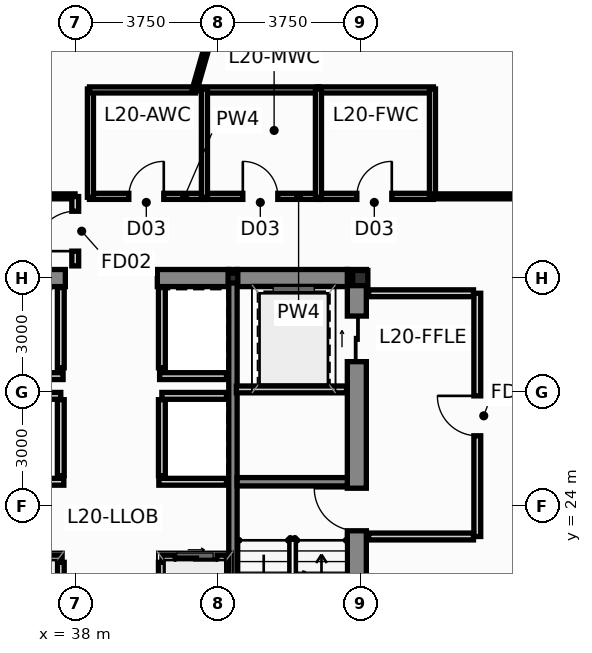
"""IFC4 building model, lengths in metres.
Left out: names, types, materials, properties, quantities, classifications, styles, units other than length and angle.
Written with IfcOpenShell. Run it as: python <this file> out.ifc"""

import sys

from ifc_helpers import new_model, si_unit, direction, frame, frame_2d, origin, origin_2d, place, context, subcontext, project, spatial, rectangle, i_section, extrude, source, transform, mapped, element, fill, save


model = new_model("IFC4")
c1 = context("Model", 3, precision=1e-05, world=origin(), true_north=direction((0.0, 1.0)))
c2 = subcontext(c1, "Body", "Model", "MODEL_VIEW")
j1 = project(units=[si_unit("LENGTHUNIT", "METRE"), si_unit("PLANEANGLEUNIT", "RADIAN")], contexts=[c1])
p1 = place(None, origin())
s1 = spatial("IfcSite", under=j1, at=p1, CompositionType="ELEMENT")
p2 = place(p1, origin())
s2 = spatial("IfcBuilding", under=s1, at=p2, CompositionType="ELEMENT")
p3 = place(p2, frame((0.0, 0.0, 79.85)))
s3 = spatial("IfcBuildingStorey", under=s2, at=p3, CompositionType="ELEMENT", Elevation=79.85)
m1 = source(origin(), c2, "Body", "SweptSolid", [
    extrude(i_section(OverallWidth=0.4, OverallDepth=0.4, WebThickness=0.02, FlangeThickness=0.032, at=origin_2d()), origin(), (0.0, 0.0, 1.0), 3.65),
])
p4 = place(p3, frame((45.5, 30.0, 0.0), z_axis=(0.0, 0.0, 1.0), x_axis=(1.0, 0.0, 0.0)))
e1 = element("IfcColumn", 1, at=p4, inside=s3, PredefinedType="COLUMN", context=c2, shape_type="MappedRepresentation", body=[
    mapped(m1, transform((0.0, 0.0, 0.0), scale=1.0)),
])
m2 = source(origin(), c2, "Body", "SweptSolid", [
    extrude(i_section(OverallWidth=0.256, OverallDepth=0.26, WebThickness=0.01, FlangeThickness=0.017, at=origin_2d()), origin(), (0.0, 0.0, 1.0), 3.65),
])
p5 = place(p3, frame((42.15, 30.0, 0.0), z_axis=(0.0, 0.0, 1.0), x_axis=(1.0, 0.0, 0.0)))
e2 = element("IfcColumn", 2, at=p5, inside=s3, PredefinedType="COLUMN", context=c2, shape_type="MappedRepresentation", body=[
    mapped(m2, transform((0.0, 0.0, 0.0), scale=1.0)),
])
p6 = place(p3, frame((45.41, 16.95, 0.0), z_axis=(0.0, 0.0, 1.0), x_axis=(0.0, 1.0, 0.0)))
e3 = element("IfcWall", 3, at=p6, inside=s3, PredefinedType="SHEAR", context=c2, shape_type="SweptSolid", body=[
    extrude(rectangle(XDim=13.275, YDim=0.5, at=frame_2d((6.638, 0.0))), origin(), (0.0, 0.0, 1.0), 3.65),
])
p7 = place(p6, frame((6.4, 0.0, 0.0)))
e4 = element("IfcOpeningElement", 4, at=p7, cuts=e3, PredefinedType="OPENING", context=c2, shape_type="SweptSolid", body=[
    extrude(rectangle(XDim=1.12, YDim=2.15, at=frame_2d((0.56, 1.075))), frame((0.0, 0.262, 0.0), z_axis=(0.0, -1.0, 0.0), x_axis=(1.0, 0.0, 0.0)), (0.0, 0.0, 1.0), 0.524),
])
p8 = place(p6, frame((10.85, 0.0, 0.0)))
e5 = element("IfcOpeningElement", 5, at=p8, cuts=e3, PredefinedType="OPENING", context=c2, shape_type="SweptSolid", body=[
    extrude(rectangle(XDim=1.2, YDim=2.2, at=frame_2d((0.6, 1.1))), frame((0.0, 0.262, 0.0), z_axis=(0.0, -1.0, 0.0), x_axis=(1.0, 0.0, 0.0)), (0.0, 0.0, 1.0), 0.524),
])
p9 = place(p3, frame((33.96, 30.0, 0.0), z_axis=(0.0, 0.0, 1.0), x_axis=(1.0, 0.0, 0.0)))
e6 = element("IfcWall", 6, at=p9, inside=s3, PredefinedType="SHEAR", context=c2, shape_type="SweptSolid", body=[
    extrude(rectangle(XDim=3.78, YDim=0.45, at=frame_2d((1.89, 0.0))), origin(), (0.0, 0.0, 1.0), 3.65),
])
p10 = place(p3, frame((40.16, 30.0, 0.0), z_axis=(0.0, 0.0, 1.0), x_axis=(1.0, 0.0, 0.0)))
e7 = element("IfcWall", 7, at=p10, inside=s3, PredefinedType="SHEAR", context=c2, shape_type="SweptSolid", body=[
    extrude(rectangle(XDim=1.88, YDim=0.45, at=frame_2d((0.94, 0.0))), origin(), (0.0, 0.0, 1.0), 3.65),
])
p11 = place(p3, frame((42.26, 30.0, 0.0), z_axis=(0.0, 0.0, 1.0), x_axis=(1.0, 0.0, 0.0)))
e8 = element("IfcWall", 8, at=p11, inside=s3, PredefinedType="SHEAR", context=c2, shape_type="SweptSolid", body=[
    extrude(rectangle(XDim=2.9, YDim=0.45, at=frame_2d((1.45, 0.0))), origin(), (0.0, 0.0, 1.0), 3.65),
])
p12 = place(p3, frame((42.15, 16.95, 0.0), z_axis=(0.0, 0.0, 1.0), x_axis=(0.0, 1.0, 0.0)))
e9 = element("IfcWall", 9, at=p12, inside=s3, PredefinedType="SHEAR", context=c2, shape_type="SweptSolid", body=[
    extrude(rectangle(XDim=13.275, YDim=0.22, at=frame_2d((6.638, 0.0))), origin(), (0.0, 0.0, 1.0), 3.65),
])
p13 = place(p3, frame((42.26, 24.64, 0.0), z_axis=(0.0, 0.0, 1.0), x_axis=(1.0, 0.0, 0.0)))
e10 = element("IfcWall", 10, at=p13, inside=s3, PredefinedType="SHEAR", context=c2, shape_type="SweptSolid", body=[
    extrude(rectangle(XDim=2.9, YDim=0.22, at=frame_2d((1.45, 0.0))), origin(), (0.0, 0.0, 1.0), 3.65),
])
p14 = place(p3, frame((34.02, 22.62, 0.0), z_axis=(0.0, 0.0, 1.0), x_axis=(1.0, 0.0, 0.0)))
e11 = element("IfcWall", 11, at=p14, inside=s3, PredefinedType="PARTITIONING", context=c2, shape_type="SweptSolid", body=[
    extrude(rectangle(XDim=3.6, YDim=0.18, at=frame_2d((1.8, 0.0))), origin(), (0.0, 0.0, 1.0), 3.4),
])
p15 = place(p14, frame((0.32, 0.0, 0.0)))
e12 = element("IfcOpeningElement", 12, at=p15, cuts=e11, PredefinedType="OPENING", context=c2, shape_type="SweptSolid", body=[
    extrude(rectangle(XDim=1.1, YDim=2.2, at=frame_2d((0.55, 1.1))), frame((0.0, 0.102, 0.0), z_axis=(0.0, -1.0, 0.0), x_axis=(1.0, 0.0, 0.0)), (0.0, 0.0, 1.0), 0.204),
])
p16 = place(p14, frame((2.12, 0.0, 0.0)))
e13 = element("IfcOpeningElement", 13, at=p16, cuts=e11, PredefinedType="OPENING", context=c2, shape_type="SweptSolid", body=[
    extrude(rectangle(XDim=1.1, YDim=2.2, at=frame_2d((0.55, 1.1))), frame((0.0, 0.102, 0.0), z_axis=(0.0, -1.0, 0.0), x_axis=(1.0, 0.0, 0.0)), (0.0, 0.0, 1.0), 0.204),
])
p17 = place(p3, frame((40.28, 22.62, 0.0), z_axis=(0.0, 0.0, 1.0), x_axis=(1.0, 0.0, 0.0)))
e14 = element("IfcWall", 14, at=p17, inside=s3, PredefinedType="PARTITIONING", context=c2, shape_type="SweptSolid", body=[
    extrude(rectangle(XDim=1.7, YDim=0.18, at=frame_2d((0.85, 0.0))), origin(), (0.0, 0.0, 1.0), 3.4),
])
p18 = place(p17, frame((0.35, 0.0, 0.0)))
e15 = element("IfcOpeningElement", 15, at=p18, cuts=e14, PredefinedType="OPENING", context=c2, shape_type="SweptSolid", body=[
    extrude(rectangle(XDim=1.1, YDim=2.2, at=frame_2d((0.55, 1.1))), frame((0.0, 0.102, 0.0), z_axis=(0.0, -1.0, 0.0), x_axis=(1.0, 0.0, 0.0)), (0.0, 0.0, 1.0), 0.204),
])
for number, where, z_axis, x_axis in (
    (16, (37.62, 20.52, 0.0), (0.0, 0.0, 1.0), (0.0, 1.0, 0.0)),
    (17, (40.28, 20.52, 0.0), (0.0, 0.0, 1.0), (0.0, 1.0, 0.0)),
):
    element("IfcWall", number, at=place(p3, frame(where, z_axis=z_axis, x_axis=x_axis)), inside=s3, PredefinedType="PARTITIONING", context=c2, shape_type="SweptSolid", body=[
        extrude(rectangle(XDim=2.0, YDim=0.18, at=frame_2d((1.0, 0.0))), origin(), (0.0, 0.0, 1.0), 3.4),
    ])
p19 = place(p3, frame((34.02, 26.9, 0.0), z_axis=(0.0, 0.0, 1.0), x_axis=(1.0, 0.0, 0.0)))
e18 = element("IfcWall", 18, at=p19, inside=s3, PredefinedType="PARTITIONING", context=c2, shape_type="SweptSolid", body=[
    extrude(rectangle(XDim=3.6, YDim=0.18, at=frame_2d((1.8, 0.0))), origin(), (0.0, 0.0, 1.0), 3.4),
])
p20 = place(p3, frame((40.28, 26.9, 0.0), z_axis=(0.0, 0.0, 1.0), x_axis=(1.0, 0.0, 0.0)))
e19 = element("IfcWall", 19, at=p20, inside=s3, PredefinedType="PARTITIONING", context=c2, shape_type="SweptSolid", body=[
    extrude(rectangle(XDim=1.7, YDim=0.18, at=frame_2d((0.85, 0.0))), origin(), (0.0, 0.0, 1.0), 3.4),
])
for number, where, z_axis, x_axis in (
    (20, (37.62, 24.8, 0.0), (0.0, 0.0, 1.0), (0.0, 1.0, 0.0)),
    (21, (40.28, 24.8, 0.0), (0.0, 0.0, 1.0), (0.0, 1.0, 0.0)),
):
    element("IfcWall", number, at=place(p3, frame(where, z_axis=z_axis, x_axis=x_axis)), inside=s3, PredefinedType="PARTITIONING", context=c2, shape_type="SweptSolid", body=[
        extrude(rectangle(XDim=2.0, YDim=0.18, at=frame_2d((1.0, 0.0))), origin(), (0.0, 0.0, 1.0), 3.4),
    ])
p21 = place(p3, frame((34.02, 24.64, 0.0), z_axis=(0.0, 0.0, 1.0), x_axis=(1.0, 0.0, 0.0)))
e22 = element("IfcWall", 22, at=p21, inside=s3, PredefinedType="PARTITIONING", context=c2, shape_type="SweptSolid", body=[
    extrude(rectangle(XDim=3.68, YDim=0.18, at=frame_2d((1.84, 0.0))), origin(), (0.0, 0.0, 1.0), 3.4),
])
p22 = place(p3, frame((40.2, 24.64, 0.0), z_axis=(0.0, 0.0, 1.0), x_axis=(1.0, 0.0, 0.0)))
e23 = element("IfcWall", 23, at=p22, inside=s3, PredefinedType="PARTITIONING", context=c2, shape_type="SweptSolid", body=[
    extrude(rectangle(XDim=1.78, YDim=0.18, at=frame_2d((0.89, 0.0))), origin(), (0.0, 0.0, 1.0), 3.4),
])
p23 = place(p3, frame((34.02, 27.42, 0.0), z_axis=(0.0, 0.0, 1.0), x_axis=(1.0, 0.0, 0.0)))
e24 = element("IfcWall", 24, at=p23, inside=s3, PredefinedType="PARTITIONING", context=c2, shape_type="SweptSolid", body=[
    extrude(rectangle(XDim=3.66, YDim=0.18, at=frame_2d((1.83, 0.0))), origin(), (0.0, 0.0, 1.0), 3.4),
])
p24 = place(p3, frame((40.22, 27.42, 0.0), z_axis=(0.0, 0.0, 1.0), x_axis=(1.0, 0.0, 0.0)))
e25 = element("IfcWall", 25, at=p24, inside=s3, PredefinedType="PARTITIONING", context=c2, shape_type="SweptSolid", body=[
    extrude(rectangle(XDim=1.76, YDim=0.18, at=frame_2d((0.88, 0.0))), origin(), (0.0, 0.0, 1.0), 3.4),
])
for number, where, z_axis, x_axis in (
    (26, (37.62, 27.64, 0.0), (0.0, 0.0, 1.0), (0.0, 1.0, 0.0)),
    (27, (40.28, 27.64, 0.0), (0.0, 0.0, 1.0), (0.0, 1.0, 0.0)),
):
    element("IfcWall", number, at=place(p3, frame(where, z_axis=z_axis, x_axis=x_axis)), inside=s3, PredefinedType="PARTITIONING", context=c2, shape_type="SweptSolid", body=[
        extrude(rectangle(XDim=2.11, YDim=0.18, at=frame_2d((1.055, 0.0))), origin(), (0.0, 0.0, 1.0), 3.4),
    ])
p25 = place(p3, frame((48.58, 23.2, 0.0), z_axis=(0.0, 0.0, 1.0), x_axis=(0.0, 1.0, 0.0)))
e28 = element("IfcWall", 28, at=p25, inside=s3, PredefinedType="PARTITIONING", context=c2, shape_type="SweptSolid", body=[
    extrude(rectangle(XDim=6.4, YDim=0.18, at=frame_2d((3.2, 0.0))), origin(), (0.0, 0.0, 1.0), 3.4),
])
p26 = place(p25, frame((2.65, 0.0, 0.0)))
e29 = element("IfcOpeningElement", 29, at=p26, cuts=e28, PredefinedType="OPENING", context=c2, shape_type="SweptSolid", body=[
    extrude(rectangle(XDim=1.05, YDim=2.15, at=frame_2d((0.525, 1.075))), frame((0.0, 0.102, 0.0), z_axis=(0.0, -1.0, 0.0), x_axis=(1.0, 0.0, 0.0)), (0.0, 0.0, 1.0), 0.204),
])
p27 = place(p3, frame((45.72, 23.2, 0.0), z_axis=(0.0, 0.0, 1.0), x_axis=(1.0, 0.0, 0.0)))
e30 = element("IfcWall", 30, at=p27, inside=s3, PredefinedType="PARTITIONING", context=c2, shape_type="SweptSolid", body=[
    extrude(rectangle(XDim=2.76, YDim=0.18, at=frame_2d((1.38, 0.0))), origin(), (0.0, 0.0, 1.0), 3.4),
])
p28 = place(p3, frame((45.72, 29.6, 0.0), z_axis=(0.0, 0.0, 1.0), x_axis=(1.0, 0.0, 0.0)))
e31 = element("IfcWall", 31, at=p28, inside=s3, PredefinedType="PARTITIONING", context=c2, shape_type="SweptSolid", body=[
    extrude(rectangle(XDim=2.76, YDim=0.18, at=frame_2d((1.38, 0.0))), origin(), (0.0, 0.0, 1.0), 2.783),
])
p29 = place(p3, frame((42.24, 27.07, 0.0), z_axis=(0.0, 0.0, 1.0), x_axis=(1.0, 0.0, 0.0)))
e32 = element("IfcWall", 32, at=p29, inside=s3, PredefinedType="PARTITIONING", context=c2, shape_type="SweptSolid", body=[
    extrude(rectangle(XDim=2.9, YDim=0.18, at=frame_2d((1.45, 0.0))), origin(), (0.0, 0.0, 1.0), 3.4),
])
p30 = place(p3, frame((38.375, 32.15, 0.0), z_axis=(0.0, 0.0, 1.0), x_axis=(1.0, 0.0, 0.0)))
e33 = element("IfcWall", 33, at=p30, inside=s3, PredefinedType="PLUMBINGWALL", context=c2, shape_type="SweptSolid", body=[
    extrude(rectangle(XDim=3.05, YDim=0.16, at=frame_2d((1.525, 0.0))), origin(), (0.0, 0.0, 1.0), 3.4),
])
p31 = place(p30, frame((1.035, 0.0, 0.0)))
e34 = element("IfcOpeningElement", 34, at=p31, cuts=e33, PredefinedType="OPENING", context=c2, shape_type="SweptSolid", body=[
    extrude(rectangle(XDim=0.92, YDim=2.1, at=frame_2d((0.46, 1.05))), frame((0.0, 0.092, 0.0), z_axis=(0.0, -1.0, 0.0), x_axis=(1.0, 0.0, 0.0)), (0.0, 0.0, 1.0), 0.184),
])
p32 = place(p3, frame((41.375, 32.15, 0.0), z_axis=(0.0, 0.0, 1.0), x_axis=(1.0, 0.0, 0.0)))
e35 = element("IfcWall", 35, at=p32, inside=s3, PredefinedType="PLUMBINGWALL", context=c2, shape_type="SweptSolid", body=[
    extrude(rectangle(XDim=3.05, YDim=0.16, at=frame_2d((1.525, 0.0))), origin(), (0.0, 0.0, 1.0), 3.4),
])
p33 = place(p32, frame((1.035, 0.0, 0.0)))
e36 = element("IfcOpeningElement", 36, at=p33, cuts=e35, PredefinedType="OPENING", context=c2, shape_type="SweptSolid", body=[
    extrude(rectangle(XDim=0.92, YDim=2.1, at=frame_2d((0.46, 1.05))), frame((0.0, 0.092, 0.0), z_axis=(0.0, -1.0, 0.0), x_axis=(1.0, 0.0, 0.0)), (0.0, 0.0, 1.0), 0.184),
])
p34 = place(p3, frame((44.375, 32.15, 0.0), z_axis=(0.0, 0.0, 1.0), x_axis=(1.0, 0.0, 0.0)))
e37 = element("IfcWall", 37, at=p34, inside=s3, PredefinedType="PLUMBINGWALL", context=c2, shape_type="SweptSolid", body=[
    extrude(rectangle(XDim=3.05, YDim=0.16, at=frame_2d((1.525, 0.0))), origin(), (0.0, 0.0, 1.0), 3.4),
])
p35 = place(p34, frame((1.035, 0.0, 0.0)))
e38 = element("IfcOpeningElement", 38, at=p35, cuts=e37, PredefinedType="OPENING", context=c2, shape_type="SweptSolid", body=[
    extrude(rectangle(XDim=0.92, YDim=2.1, at=frame_2d((0.46, 1.05))), frame((0.0, 0.092, 0.0), z_axis=(0.0, -1.0, 0.0), x_axis=(1.0, 0.0, 0.0)), (0.0, 0.0, 1.0), 0.184),
])
for number, where, z_axis, x_axis in (
    (39, (41.375, 34.95, 0.0), (0.0, 0.0, 1.0), (1.0, 0.0, 0.0)),
    (40, (47.425, 34.95, 0.0), (0.0, 0.0, 1.0), (-1.0, 0.0, 0.0)),
):
    element("IfcWall", number, at=place(p3, frame(where, z_axis=z_axis, x_axis=x_axis)), inside=s3, PredefinedType="PLUMBINGWALL", context=c2, shape_type="SweptSolid", body=[
        extrude(rectangle(XDim=3.05, YDim=0.16, at=frame_2d((1.525, 0.0))), origin(), (0.0, 0.0, 1.0), 3.026),
    ])
for number, where, z_axis, x_axis in (
    (41, (41.4, 32.125, 0.0), (0.0, 0.0, 1.0), (0.0, 1.0, 0.0)),
    (42, (38.4, 32.125, 0.0), (0.0, 0.0, 1.0), (0.0, 1.0, 0.0)),
    (43, (44.4, 32.125, 0.0), (0.0, 0.0, 1.0), (0.0, 1.0, 0.0)),
    (44, (47.4, 32.125, 0.0), (0.0, 0.0, 1.0), (0.0, 1.0, 0.0)),
):
    element("IfcWall", number, at=place(p3, frame(where, z_axis=z_axis, x_axis=x_axis)), inside=s3, PredefinedType="PLUMBINGWALL", context=c2, shape_type="SweptSolid", body=[
        extrude(rectangle(XDim=2.85, YDim=0.16, at=frame_2d((1.425, 0.0))), origin(), (0.0, 0.0, 1.0), 3.4),
    ])
p36 = place(p3, frame((38.375, 34.95, 0.0), z_axis=(0.0, 0.0, 1.0), x_axis=(1.0, 0.0, 0.0)))
e45 = element("IfcWall", 45, at=p36, inside=s3, PredefinedType="PLUMBINGWALL", context=c2, shape_type="SweptSolid", body=[
    extrude(rectangle(XDim=2.79, YDim=0.16, at=frame_2d((1.395, 0.0))), origin(), (0.0, 0.0, 1.0), 3.026),
])
p37 = place(p3, frame((41.141, 34.955, 0.0), z_axis=(0.0, 0.0, 1.0), x_axis=(0.275328429026, 0.961350225553, 0.0)))
e46 = element("IfcWall", 46, at=p37, inside=s3, PredefinedType="PARTITIONING", context=c2, shape_type="SweptSolid", body=[
    extrude(rectangle(XDim=15.449, YDim=0.13, at=frame_2d((7.725, 0.0))), origin(), (0.0, 0.0, 1.0), 3.4),
])
p38 = place(p3, frame((33.485, 32.15, 0.0), z_axis=(0.0, 0.0, 1.0), x_axis=(1.0, 0.0, 0.0)))
e47 = element("IfcWall", 47, at=p38, inside=s3, PredefinedType="PARTITIONING", context=c2, shape_type="SweptSolid", body=[
    extrude(rectangle(XDim=4.51, YDim=0.13, at=frame_2d((2.255, 0.0))), origin(), (0.0, 0.0, 1.0), 3.4),
])
p39 = place(p38, frame((1.775, 0.0, 0.0)))
e48 = element("IfcOpeningElement", 48, at=p39, cuts=e47, PredefinedType="OPENING", context=c2, shape_type="SweptSolid", body=[
    extrude(rectangle(XDim=0.96, YDim=2.15, at=frame_2d((0.48, 1.075))), frame((0.0, 0.077, 0.0), z_axis=(0.0, -1.0, 0.0), x_axis=(1.0, 0.0, 0.0)), (0.0, 0.0, 1.0), 0.154),
])
p40 = place(p3, frame((47.405, 32.15, 0.0), z_axis=(0.0, 0.0, 1.0), x_axis=(1.0, 0.0, 0.0)))
e49 = element("IfcWall", 49, at=p40, inside=s3, PredefinedType="PARTITIONING", context=c2, shape_type="SweptSolid", body=[
    extrude(rectangle(XDim=3.19, YDim=0.13, at=frame_2d((1.595, 0.0))), origin(), (0.0, 0.0, 1.0), 3.4),
])
p41 = place(p3, frame((38.0, 30.32, 0.0), z_axis=(0.0, 0.0, 1.0), x_axis=(0.0, 1.0, 0.0)))
e50 = element("IfcWall", 50, at=p41, inside=s3, PredefinedType="PARTITIONING", context=c2, shape_type="SweptSolid", body=[
    extrude(rectangle(XDim=1.825, YDim=0.18, at=frame_2d((0.913, 0.0))), origin(), (0.0, 0.0, 1.0), 3.4),
])
p42 = place(p41, frame((0.388, 0.0, 0.0)))
e51 = element("IfcOpeningElement", 51, at=p42, cuts=e50, PredefinedType="OPENING", context=c2, shape_type="SweptSolid", body=[
    extrude(rectangle(XDim=1.05, YDim=2.15, at=frame_2d((0.525, 1.075))), frame((0.0, 0.102, 0.0), z_axis=(0.0, -1.0, 0.0), x_axis=(1.0, 0.0, 0.0)), (0.0, 0.0, 1.0), 0.204),
])
p43 = place(p7, origin())
e52 = element("IfcDoor", 52, at=p43, inside=s3, OperationType="SINGLE_SWING_RIGHT", PredefinedType="DOOR", context=c2, shape_type="SweptSolid", body=[
    extrude(rectangle(XDim=1.12, YDim=2.15, at=frame_2d((0.56, 1.075))), frame((0.0, 0.025, 0.0), z_axis=(0.0, -1.0, 0.0), x_axis=(1.0, 0.0, 0.0)), (0.0, 0.0, 1.0), 0.05),
])
fill(e4, e52)
p44 = place(p8, origin())
e53 = element("IfcDoor", 53, at=p44, inside=s3, OperationType="SLIDING_TO_RIGHT", PredefinedType="DOOR", context=c2, shape_type="SweptSolid", body=[
    extrude(rectangle(XDim=1.2, YDim=2.2, at=frame_2d((0.6, 1.1))), frame((0.0, 0.025, 0.0), z_axis=(0.0, -1.0, 0.0), x_axis=(1.0, 0.0, 0.0)), (0.0, 0.0, 1.0), 0.05),
])
fill(e5, e53)
p45 = place(p18, origin())
e54 = element("IfcDoor", 54, at=p45, inside=s3, OperationType="SLIDING_TO_LEFT", PredefinedType="DOOR", context=c2, shape_type="SweptSolid", body=[
    extrude(rectangle(XDim=1.1, YDim=2.2, at=frame_2d((0.55, 1.1))), frame((0.0, 0.025, 0.0), z_axis=(0.0, -1.0, 0.0), x_axis=(1.0, 0.0, 0.0)), (0.0, 0.0, 1.0), 0.05),
])
fill(e15, e54)
p46 = place(p26, origin())
e55 = element("IfcDoor", 55, at=p46, inside=s3, OperationType="SINGLE_SWING_RIGHT", PredefinedType="DOOR", context=c2, shape_type="SweptSolid", body=[
    extrude(rectangle(XDim=1.05, YDim=2.15, at=frame_2d((0.525, 1.075))), frame((0.0, 0.025, 0.0), z_axis=(0.0, -1.0, 0.0), x_axis=(1.0, 0.0, 0.0)), (0.0, 0.0, 1.0), 0.05),
])
fill(e29, e55)
p47 = place(p31, origin())
e56 = element("IfcDoor", 56, at=p47, inside=s3, OperationType="SINGLE_SWING_RIGHT", PredefinedType="DOOR", context=c2, shape_type="SweptSolid", body=[
    extrude(rectangle(XDim=0.92, YDim=2.1, at=frame_2d((0.46, 1.05))), frame((0.0, 0.025, 0.0), z_axis=(0.0, -1.0, 0.0), x_axis=(1.0, 0.0, 0.0)), (0.0, 0.0, 1.0), 0.05),
])
fill(e34, e56)
p48 = place(p33, origin())
e57 = element("IfcDoor", 57, at=p48, inside=s3, OperationType="SINGLE_SWING_LEFT", PredefinedType="DOOR", context=c2, shape_type="SweptSolid", body=[
    extrude(rectangle(XDim=0.92, YDim=2.1, at=frame_2d((0.46, 1.05))), frame((0.0, 0.025, 0.0), z_axis=(0.0, -1.0, 0.0), x_axis=(1.0, 0.0, 0.0)), (0.0, 0.0, 1.0), 0.05),
])
fill(e36, e57)
p49 = place(p35, origin())
e58 = element("IfcDoor", 58, at=p49, inside=s3, OperationType="SINGLE_SWING_RIGHT", PredefinedType="DOOR", context=c2, shape_type="SweptSolid", body=[
    extrude(rectangle(XDim=0.92, YDim=2.1, at=frame_2d((0.46, 1.05))), frame((0.0, 0.025, 0.0), z_axis=(0.0, -1.0, 0.0), x_axis=(1.0, 0.0, 0.0)), (0.0, 0.0, 1.0), 0.05),
])
fill(e38, e58)
p50 = place(p42, origin())
e59 = element("IfcDoor", 59, at=p50, inside=s3, OperationType="SINGLE_SWING_LEFT", PredefinedType="DOOR", context=c2, shape_type="SweptSolid", body=[
    extrude(rectangle(XDim=1.05, YDim=2.15, at=frame_2d((0.525, 1.075))), frame((0.0, 0.025, 0.0), z_axis=(0.0, -1.0, 0.0), x_axis=(1.0, 0.0, 0.0)), (0.0, 0.0, 1.0), 0.05),
])
fill(e51, e59)
save(model, sys.argv[1])
